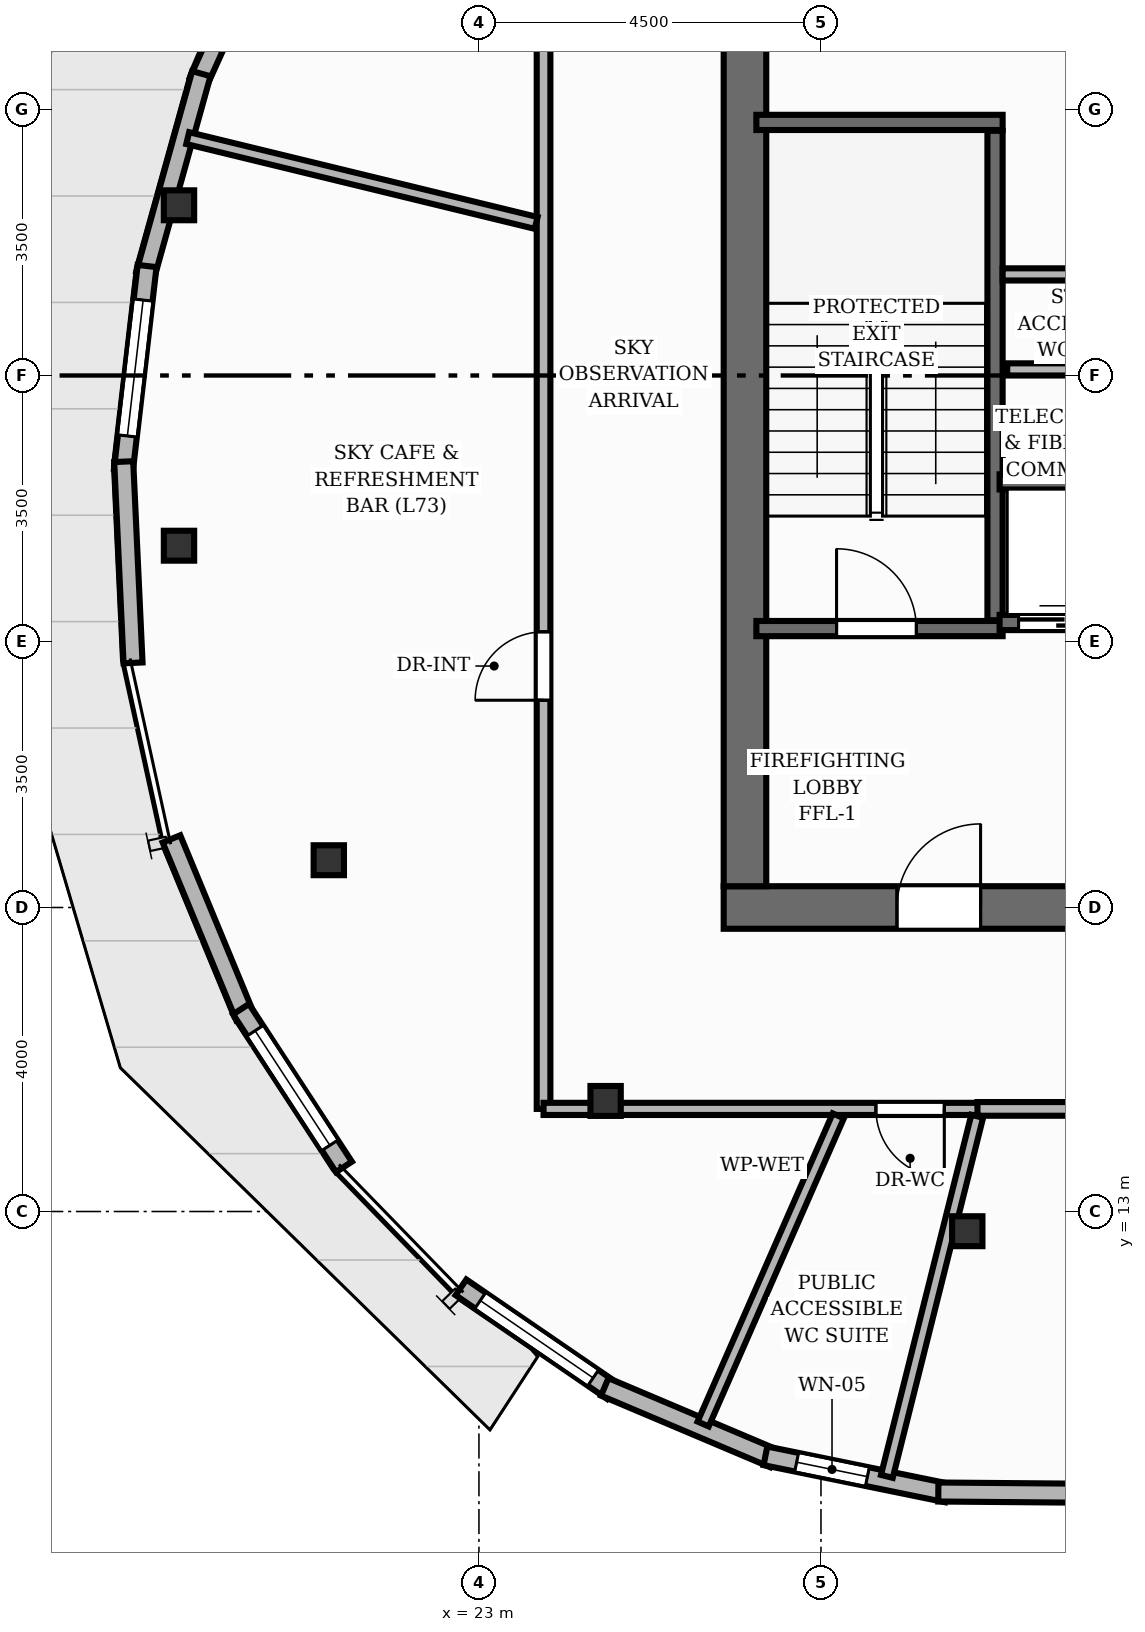
"""IFC4 building model, lengths in metres.
Left out: names, types, materials, properties, quantities, classifications, styles, units other than length and angle.
Written with IfcOpenShell. Run it as: python <this file> out.ifc"""

import sys

from ifc_helpers import new_model, si_unit, direction, frame, frame_2d, origin, origin_2d, place, context, subcontext, project, spatial, rectangle, i_section, extrude, element, fill, save


model = new_model("IFC4")
c1 = context("Model", 3, precision=1e-05, world=origin(), true_north=direction((0.0, 1.0)))
c2 = subcontext(c1, "Body", "Model", "MODEL_VIEW")
j1 = project(units=[si_unit("LENGTHUNIT", "METRE"), si_unit("PLANEANGLEUNIT", "RADIAN")], contexts=[c1])
p1 = place(None, origin())
s1 = spatial("IfcSite", under=j1, at=p1, CompositionType="ELEMENT")
p2 = place(p1, origin())
s2 = spatial("IfcBuilding", under=s1, at=p2, CompositionType="ELEMENT")
p3 = place(p2, frame((0.0, 0.0, 243.04)))
s3 = spatial("IfcBuildingStorey", under=s2, at=p3, CompositionType="ELEMENT", Elevation=243.04)
p4 = place(p3, frame((26.22, 17.0, 0.0), z_axis=(0.0, 0.0, 1.0), x_axis=(1.0, 0.0, 0.0)))
e1 = element("IfcWall", 1, at=p4, inside=s3, PredefinedType="SHEAR", context=c2, shape_type="SweptSolid", body=[
    extrude(rectangle(XDim=11.56, YDim=0.56, at=frame_2d((5.78, 0.0))), origin(), (0.0, 0.0, 1.0), 3.84),
])
p5 = place(p4, frame((2.28, 0.0, 0.0)))
e2 = element("IfcOpeningElement", 2, at=p5, cuts=e1, PredefinedType="OPENING", context=c2, shape_type="SweptSolid", body=[
    extrude(rectangle(XDim=1.1, YDim=2.15, at=frame_2d((0.55, 1.075))), frame((0.0, 0.29, 0.0), z_axis=(0.0, -1.0, 0.0), x_axis=(1.0, 0.0, 0.0)), (0.0, 0.0, 1.0), 0.58),
])
p6 = place(p4, frame((7.68, 0.0, 0.0)))
e3 = element("IfcOpeningElement", 3, at=p6, cuts=e1, PredefinedType="OPENING", context=c2, shape_type="SweptSolid", body=[
    extrude(rectangle(XDim=1.1, YDim=2.15, at=frame_2d((0.55, 1.075))), frame((0.0, 0.29, 0.0), z_axis=(0.0, -1.0, 0.0), x_axis=(1.0, 0.0, 0.0)), (0.0, 0.0, 1.0), 0.58),
])
p7 = place(p4, frame((9.48, 0.0, 0.0)))
e4 = element("IfcOpeningElement", 4, at=p7, cuts=e1, PredefinedType="OPENING", context=c2, shape_type="SweptSolid", body=[
    extrude(rectangle(XDim=1.1, YDim=2.15, at=frame_2d((0.55, 1.075))), frame((0.0, 0.29, 0.0), z_axis=(0.0, -1.0, 0.0), x_axis=(1.0, 0.0, 0.0)), (0.0, 0.0, 1.0), 0.58),
])
p8 = place(p4, frame((5.83, 0.0, 0.0)))
e5 = element("IfcOpeningElement", 5, at=p8, cuts=e1, PredefinedType="OPENING", context=c2, shape_type="SweptSolid", body=[
    extrude(rectangle(XDim=0.9, YDim=2.1, at=frame_2d((0.45, 1.05))), frame((0.0, 0.29, 0.0), z_axis=(0.0, -1.0, 0.0), x_axis=(1.0, 0.0, 0.0)), (0.0, 0.0, 1.0), 0.58),
])
p9 = place(p3, frame((26.5, 17.28, 0.0), z_axis=(0.0, 0.0, 1.0), x_axis=(0.0, 1.0, 0.0)))
e6 = element("IfcWall", 6, at=p9, inside=s3, PredefinedType="SHEAR", context=c2, shape_type="SweptSolid", body=[
    extrude(rectangle(XDim=13.44, YDim=0.56, at=frame_2d((6.72, 0.0))), origin(), (0.0, 0.0, 1.0), 3.84),
])
for number, where, z_axis, x_axis in (
    (7, (19.054, 26.24, 0.0), (0.0, 0.0, 1.0), (1.0, 0.0, 0.0)),
    (8, (19.054, 21.76, 0.0), (0.0, 0.0, 1.0), (1.0, 0.0, 0.0)),
    (9, (21.025, 17.622, 0.0), (0.0, 0.0, 1.0), (1.0, 0.0, 0.0)),
    (10, (24.667, 14.455, 0.0), (0.0, 0.0, 1.0), (1.0, 0.0, 0.0)),
    (11, (29.425, 12.74, 0.0), (0.0, 0.0, 1.0), (1.0, 0.0, 0.0)),
):
    element("IfcColumn", number, at=place(p3, frame(where, z_axis=z_axis, x_axis=x_axis)), inside=s3, PredefinedType="COLUMN", context=c2, shape_type="SweptSolid", body=[
        extrude(i_section(OverallWidth=0.399, OverallDepth=0.394, WebThickness=0.023, FlangeThickness=0.037, at=origin_2d()), origin(), (0.0, 0.0, 1.0), 3.84),
    ])
p10 = place(p3, frame((19.31, 27.869, 0.0), z_axis=(0.0, 0.0, 1.0), x_axis=(0.411961415151, 0.911201290839, 0.0)))
e12 = element("IfcWall", 12, at=p10, inside=s3, PredefinedType="SOLIDWALL", context=c2, shape_type="SweptSolid", body=[
    extrude(rectangle(XDim=2.758, YDim=0.25, at=frame_2d((1.379, 0.0))), origin(), (0.0, 0.0, 1.0), 3.52),
])
p11 = place(p10, frame((0.479, 0.0, 0.85)))
e13 = element("IfcOpeningElement", 13, at=p11, cuts=e12, PredefinedType="OPENING", context=c2, shape_type="SweptSolid", body=[
    extrude(rectangle(XDim=1.8, YDim=2.0, at=frame_2d((0.9, 1.0))), frame((0.0, 0.135, 0.0), z_axis=(0.0, -1.0, 0.0), x_axis=(1.0, 0.0, 0.0)), (0.0, 0.0, 1.0), 0.27),
])
p12 = place(p3, frame((18.613, 25.333, 0.0), z_axis=(0.0, 0.0, 1.0), x_axis=(0.268356519564, 0.963319665743, 0.0)))
e14 = element("IfcWall", 14, at=p12, inside=s3, PredefinedType="SOLIDWALL", context=c2, shape_type="SweptSolid", body=[
    extrude(rectangle(XDim=2.738, YDim=0.25, at=frame_2d((1.369, 0.0))), origin(), (0.0, 0.0, 1.0), 3.137),
])
p13 = place(p3, frame((18.323, 22.757, 0.0), z_axis=(0.0, 0.0, 1.0), x_axis=(0.115121415392, 0.993351428105, 0.0)))
e15 = element("IfcWall", 15, at=p13, inside=s3, PredefinedType="SOLIDWALL", context=c2, shape_type="SweptSolid", body=[
    extrude(rectangle(XDim=2.702, YDim=0.25, at=frame_2d((1.351, 0.0))), origin(), (0.0, 0.0, 1.0), 3.137),
])
p14 = place(p13, frame((0.451, 0.0, 0.85)))
e16 = element("IfcOpeningElement", 16, at=p14, cuts=e15, PredefinedType="OPENING", context=c2, shape_type="SweptSolid", body=[
    extrude(rectangle(XDim=1.8, YDim=2.0, at=frame_2d((0.9, 1.0))), frame((0.0, 0.135, 0.0), z_axis=(0.0, -1.0, 0.0), x_axis=(1.0, 0.0, 0.0)), (0.0, 0.0, 1.0), 0.27),
])
p15 = place(p3, frame((18.449, 20.219, 0.0), z_axis=(0.0, 0.0, 1.0), x_axis=(-0.046326751692, 0.998926339666, 0.0)))
e17 = element("IfcWall", 17, at=p15, inside=s3, PredefinedType="SOLIDWALL", context=c2, shape_type="SweptSolid", body=[
    extrude(rectangle(XDim=2.651, YDim=0.25, at=frame_2d((1.325, 0.0))), origin(), (0.0, 0.0, 1.0), 3.52),
])
p16 = place(p3, frame((19.923, 15.563, 0.0), z_axis=(0.0, 0.0, 1.0), x_axis=(-0.382320564885, 0.924029753669, 0.0)))
e18 = element("IfcWall", 18, at=p16, inside=s3, PredefinedType="SOLIDWALL", context=c2, shape_type="SweptSolid", body=[
    extrude(rectangle(XDim=2.532, YDim=0.25, at=frame_2d((1.266, 0.0))), origin(), (0.0, 0.0, 1.0), 3.52),
])
p17 = place(p3, frame((21.224, 13.587, 0.0), z_axis=(0.0, 0.0, 1.0), x_axis=(-0.546327887975, 0.837571393268, 0.0)))
e19 = element("IfcWall", 19, at=p17, inside=s3, PredefinedType="SOLIDWALL", context=c2, shape_type="SweptSolid", body=[
    extrude(rectangle(XDim=2.478, YDim=0.25, at=frame_2d((1.239, 0.0))), origin(), (0.0, 0.0, 1.0), 3.52),
])
p18 = place(p17, frame((0.339, 0.0, 0.85)))
e20 = element("IfcOpeningElement", 20, at=p18, cuts=e19, PredefinedType="OPENING", context=c2, shape_type="SweptSolid", body=[
    extrude(rectangle(XDim=1.8, YDim=2.0, at=frame_2d((0.9, 1.0))), frame((0.0, 0.135, 0.0), z_axis=(0.0, -1.0, 0.0), x_axis=(1.0, 0.0, 0.0)), (0.0, 0.0, 1.0), 0.27),
])
p19 = place(p3, frame((24.756, 10.637, 0.0), z_axis=(0.0, 0.0, 1.0), x_axis=(-0.824905308137, 0.565270937345, 0.0)))
e21 = element("IfcWall", 21, at=p19, inside=s3, PredefinedType="SOLIDWALL", context=c2, shape_type="SweptSolid", body=[
    extrude(rectangle(XDim=2.415, YDim=0.25, at=frame_2d((1.208, 0.0))), origin(), (0.0, 0.0, 1.0), 3.52),
])
p20 = place(p19, frame((0.307, 0.0, 0.85)))
e22 = element("IfcOpeningElement", 22, at=p20, cuts=e21, PredefinedType="OPENING", context=c2, shape_type="SweptSolid", body=[
    extrude(rectangle(XDim=1.8, YDim=2.0, at=frame_2d((0.9, 1.0))), frame((0.0, 0.135, 0.0), z_axis=(0.0, -1.0, 0.0), x_axis=(1.0, 0.0, 0.0)), (0.0, 0.0, 1.0), 0.27),
])
p21 = place(p3, frame((26.879, 9.751, 0.0), z_axis=(0.0, 0.0, 1.0), x_axis=(-0.920923989116, 0.389742230546, 0.0)))
e23 = element("IfcWall", 23, at=p21, inside=s3, PredefinedType="SOLIDWALL", context=c2, shape_type="SweptSolid", body=[
    extrude(rectangle(XDim=2.415, YDim=0.25, at=frame_2d((1.208, 0.0))), origin(), (0.0, 0.0, 1.0), 3.52),
])
p22 = place(p3, frame((29.157, 9.297, 0.0), z_axis=(0.0, 0.0, 1.0), x_axis=(-0.979739512471, 0.200276028779, 0.0)))
e24 = element("IfcWall", 24, at=p22, inside=s3, PredefinedType="SOLIDWALL", context=c2, shape_type="SweptSolid", body=[
    extrude(rectangle(XDim=2.437, YDim=0.25, at=frame_2d((1.218, 0.0))), origin(), (0.0, 0.0, 1.0), 3.52),
])
p23 = place(p22, frame((1.068, 0.0, 0.85)))
e25 = element("IfcOpeningElement", 25, at=p23, cuts=e24, PredefinedType="OPENING", context=c2, shape_type="SweptSolid", body=[
    extrude(rectangle(XDim=0.95, YDim=1.45, at=frame_2d((0.475, 0.725))), frame((0.0, 0.135, 0.0), z_axis=(0.0, -1.0, 0.0), x_axis=(1.0, 0.0, 0.0)), (0.0, 0.0, 1.0), 0.27),
])
p24 = place(p3, frame((31.521, 9.289, 0.0), z_axis=(0.0, 0.0, 1.0), x_axis=(-0.999965743314, 0.008277209543, 0.0)))
e26 = element("IfcWall", 26, at=p24, inside=s3, PredefinedType="SOLIDWALL", context=c2, shape_type="SweptSolid", body=[
    extrude(rectangle(XDim=2.478, YDim=0.25, at=frame_2d((1.239, 0.0))), origin(), (0.0, 0.0, 1.0), 3.52),
])
p25 = place(p3, frame((29.79, 20.78, 0.0), z_axis=(0.0, 0.0, 1.0), x_axis=(0.0, 1.0, 0.0)))
e27 = element("IfcWall", 27, at=p25, inside=s3, PredefinedType="SHEAR", context=c2, shape_type="SweptSolid", body=[
    extrude(rectangle(XDim=6.44, YDim=0.2, at=frame_2d((3.22, 0.0))), origin(), (0.0, 0.0, 1.0), 3.84),
])
p26 = place(p3, frame((26.65, 27.33, 0.0), z_axis=(0.0, 0.0, 1.0), x_axis=(1.0, 0.0, 0.0)))
e28 = element("IfcWall", 28, at=p26, inside=s3, PredefinedType="SHEAR", context=c2, shape_type="SweptSolid", body=[
    extrude(rectangle(XDim=3.24, YDim=0.2, at=frame_2d((1.62, 0.0))), origin(), (0.0, 0.0, 1.0), 3.84),
])
p27 = place(p3, frame((26.65, 20.67, 0.0), z_axis=(0.0, 0.0, 1.0), x_axis=(1.0, 0.0, 0.0)))
e29 = element("IfcWall", 29, at=p27, inside=s3, PredefinedType="SHEAR", context=c2, shape_type="SweptSolid", body=[
    extrude(rectangle(XDim=3.24, YDim=0.2, at=frame_2d((1.62, 0.0))), origin(), (0.0, 0.0, 1.0), 3.84),
])
p28 = place(p27, frame((1.055, 0.0, 0.0)))
e30 = element("IfcOpeningElement", 30, at=p28, cuts=e29, PredefinedType="OPENING", context=c2, shape_type="SweptSolid", body=[
    extrude(rectangle(XDim=1.05, YDim=2.15, at=frame_2d((0.525, 1.075))), frame((0.0, 0.11, 0.0), z_axis=(0.0, -1.0, 0.0), x_axis=(1.0, 0.0, 0.0)), (0.0, 0.0, 1.0), 0.22),
])
p29 = place(p3, frame((29.85, 20.75, 0.0), z_axis=(0.0, 0.0, 1.0), x_axis=(1.0, 0.0, 0.0)))
e31 = element("IfcWall", 31, at=p29, inside=s3, PredefinedType="SHEAR", context=c2, shape_type="SweptSolid", body=[
    extrude(rectangle(XDim=2.3, YDim=0.2, at=frame_2d((1.15, 0.0))), origin(), (0.0, 0.0, 1.0), 3.84),
])
p30 = place(p29, frame((0.25, 0.0, 0.0)))
e32 = element("IfcOpeningElement", 32, at=p30, cuts=e31, PredefinedType="OPENING", context=c2, shape_type="SweptSolid", body=[
    extrude(rectangle(XDim=1.1, YDim=2.15, at=frame_2d((0.55, 1.075))), frame((0.0, 0.11, 0.0), z_axis=(0.0, -1.0, 0.0), x_axis=(1.0, 0.0, 0.0)), (0.0, 0.0, 1.0), 0.22),
])
p31 = place(p3, frame((29.85, 22.6, 0.0), z_axis=(0.0, 0.0, 1.0), x_axis=(1.0, 0.0, 0.0)))
e33 = element("IfcWall", 33, at=p31, inside=s3, PredefinedType="SHEAR", context=c2, shape_type="SweptSolid", body=[
    extrude(rectangle(XDim=2.3, YDim=0.2, at=frame_2d((1.15, 0.0))), origin(), (0.0, 0.0, 1.0), 3.84),
])
p32 = place(p3, frame((29.95, 24.08, 0.0), z_axis=(0.0, 0.0, 1.0), x_axis=(1.0, 0.0, 0.0)))
e34 = element("IfcWall", 34, at=p32, inside=s3, PredefinedType="PLUMBINGWALL", context=c2, shape_type="SweptSolid", body=[
    extrude(rectangle(XDim=4.13, YDim=0.16, at=frame_2d((2.065, 0.0))), origin(), (0.0, 0.0, 1.0), 3.515),
])
p33 = place(p32, frame((2.55, 0.0, 0.0)))
e35 = element("IfcOpeningElement", 35, at=p33, cuts=e34, PredefinedType="OPENING", context=c2, shape_type="SweptSolid", body=[
    extrude(rectangle(XDim=0.9, YDim=2.1, at=frame_2d((0.45, 1.05))), frame((0.0, 0.09, 0.0), z_axis=(0.0, -1.0, 0.0), x_axis=(1.0, 0.0, 0.0)), (0.0, 0.0, 1.0), 0.18),
])
p34 = place(p3, frame((29.89, 25.33, 0.0), z_axis=(0.0, 0.0, 1.0), x_axis=(1.0, 0.0, 0.0)))
e36 = element("IfcWall", 36, at=p34, inside=s3, PredefinedType="PLUMBINGWALL", context=c2, shape_type="SweptSolid", body=[
    extrude(rectangle(XDim=1.94, YDim=0.16, at=frame_2d((0.97, 0.0))), origin(), (0.0, 0.0, 1.0), 3.515),
])
p35 = place(p3, frame((23.85, 14.35, 0.0), z_axis=(0.0, 0.0, 1.0), x_axis=(0.0, 1.0, 0.0)))
e37 = element("IfcWall", 37, at=p35, inside=s3, PredefinedType="PARTITIONING", context=c2, shape_type="SweptSolid", body=[
    extrude(rectangle(XDim=19.3, YDim=0.18, at=frame_2d((9.65, 0.0))), origin(), (0.0, 0.0, 1.0), 3.515),
])
p36 = place(p35, frame((5.377, 0.0, 0.0)))
e38 = element("IfcOpeningElement", 38, at=p36, cuts=e37, PredefinedType="OPENING", context=c2, shape_type="SweptSolid", body=[
    extrude(rectangle(XDim=0.9, YDim=2.1, at=frame_2d((0.45, 1.05))), frame((0.0, 0.1, 0.0), z_axis=(0.0, -1.0, 0.0), x_axis=(1.0, 0.0, 0.0)), (0.0, 0.0, 1.0), 0.2),
])
p37 = place(p3, frame((29.6, 14.35, 0.0), z_axis=(0.0, 0.0, 1.0), x_axis=(-1.0, 0.0, 0.0)))
e39 = element("IfcWall", 39, at=p37, inside=s3, PredefinedType="PLUMBINGWALL", context=c2, shape_type="SweptSolid", body=[
    extrude(rectangle(XDim=5.75, YDim=0.16, at=frame_2d((2.875, 0.0))), origin(), (0.0, 0.0, 1.0), 3.048),
])
p38 = place(p37, frame((0.477, 0.0, 0.0)))
e40 = element("IfcOpeningElement", 40, at=p38, cuts=e39, PredefinedType="OPENING", context=c2, shape_type="SweptSolid", body=[
    extrude(rectangle(XDim=0.9, YDim=2.1, at=frame_2d((0.45, 1.05))), frame((0.0, 0.09, 0.0), z_axis=(0.0, -1.0, 0.0), x_axis=(1.0, 0.0, 0.0)), (0.0, 0.0, 1.0), 0.18),
])
p39 = place(p3, frame((40.15, 14.35, 0.0), z_axis=(0.0, 0.0, 1.0), x_axis=(-1.0, 0.0, 0.0)))
e41 = element("IfcWall", 41, at=p39, inside=s3, PredefinedType="PARTITIONING", context=c2, shape_type="SweptSolid", body=[
    extrude(rectangle(XDim=10.591, YDim=0.18, at=frame_2d((5.295, 0.0))), origin(), (0.0, 0.0, 1.0), 3.048),
])
p40 = place(p39, frame((4.845, 0.0, 0.0)))
e42 = element("IfcOpeningElement", 42, at=p40, cuts=e41, PredefinedType="OPENING", context=c2, shape_type="SweptSolid", body=[
    extrude(rectangle(XDim=0.9, YDim=2.1, at=frame_2d((0.45, 1.05))), frame((0.0, 0.1, 0.0), z_axis=(0.0, -1.0, 0.0), x_axis=(1.0, 0.0, 0.0)), (0.0, 0.0, 1.0), 0.2),
])
p41 = place(p3, frame((23.753, 26.007, 0.0), z_axis=(0.0, 0.0, 1.0), x_axis=(-0.971624549103, 0.236528509024, 0.0)))
e43 = element("IfcWall", 43, at=p41, inside=s3, PredefinedType="PLUMBINGWALL", context=c2, shape_type="SweptSolid", body=[
    extrude(rectangle(XDim=4.718, YDim=0.16, at=frame_2d((2.359, 0.0))), origin(), (0.0, 0.0, 1.0), 3.515),
])
p42 = place(p3, frame((27.728, 14.258, 0.0), z_axis=(0.0, 0.0, 1.0), x_axis=(-0.40164607795, -0.91579497054, 0.0)))
e44 = element("IfcWall", 44, at=p42, inside=s3, PredefinedType="PLUMBINGWALL", context=c2, shape_type="SweptSolid", body=[
    extrude(rectangle(XDim=4.427, YDim=0.16, at=frame_2d((2.213, 0.0))), origin(), (0.0, 0.0, 1.0), 3.515),
])
p43 = place(p3, frame((28.367, 9.515, 0.0), z_axis=(0.0, 0.0, 1.0), x_axis=(0.243299941273, 0.969951101127, 0.0)))
e45 = element("IfcWall", 45, at=p43, inside=s3, PredefinedType="PLUMBINGWALL", context=c2, shape_type="SweptSolid", body=[
    extrude(rectangle(XDim=4.885, YDim=0.16, at=frame_2d((2.442, 0.0))), origin(), (0.0, 0.0, 1.0), 2.963),
])
p44 = place(p14, origin())
e46 = element("IfcWindow", 46, at=p44, inside=s3, PartitioningType="SINGLE_PANEL", PredefinedType="WINDOW", context=c2, shape_type="SweptSolid", body=[
    extrude(rectangle(XDim=1.8, YDim=2.0, at=frame_2d((0.9, 1.0))), frame((0.0, 0.03, 0.0), z_axis=(0.0, -1.0, 0.0), x_axis=(1.0, 0.0, 0.0)), (0.0, 0.0, 1.0), 0.06),
])
fill(e16, e46)
p45 = place(p18, origin())
e47 = element("IfcWindow", 47, at=p45, inside=s3, PartitioningType="SINGLE_PANEL", PredefinedType="WINDOW", context=c2, shape_type="SweptSolid", body=[
    extrude(rectangle(XDim=1.8, YDim=2.0, at=frame_2d((0.9, 1.0))), frame((0.0, 0.03, 0.0), z_axis=(0.0, -1.0, 0.0), x_axis=(1.0, 0.0, 0.0)), (0.0, 0.0, 1.0), 0.06),
])
fill(e20, e47)
p46 = place(p20, origin())
e48 = element("IfcWindow", 48, at=p46, inside=s3, PartitioningType="SINGLE_PANEL", PredefinedType="WINDOW", context=c2, shape_type="SweptSolid", body=[
    extrude(rectangle(XDim=1.8, YDim=2.0, at=frame_2d((0.9, 1.0))), frame((0.0, 0.03, 0.0), z_axis=(0.0, -1.0, 0.0), x_axis=(1.0, 0.0, 0.0)), (0.0, 0.0, 1.0), 0.06),
])
fill(e22, e48)
p47 = place(p23, origin())
e49 = element("IfcWindow", 49, at=p47, inside=s3, PartitioningType="SINGLE_PANEL", PredefinedType="WINDOW", context=c2, shape_type="SweptSolid", body=[
    extrude(rectangle(XDim=0.95, YDim=1.45, at=frame_2d((0.475, 0.725))), frame((0.0, 0.03, 0.0), z_axis=(0.0, -1.0, 0.0), x_axis=(1.0, 0.0, 0.0)), (0.0, 0.0, 1.0), 0.06),
])
fill(e25, e49)
p48 = place(p28, origin())
e50 = element("IfcDoor", 50, at=p48, inside=s3, OperationType="SINGLE_SWING_LEFT", PredefinedType="DOOR", context=c2, shape_type="SweptSolid", body=[
    extrude(rectangle(XDim=1.05, YDim=2.15, at=frame_2d((0.525, 1.075))), frame((0.0, 0.025, 0.0), z_axis=(0.0, -1.0, 0.0), x_axis=(1.0, 0.0, 0.0)), (0.0, 0.0, 1.0), 0.05),
])
fill(e30, e50)
p49 = place(p5, origin())
e51 = element("IfcDoor", 51, at=p49, inside=s3, OperationType="SINGLE_SWING_RIGHT", PredefinedType="DOOR", context=c2, shape_type="SweptSolid", body=[
    extrude(rectangle(XDim=1.1, YDim=2.15, at=frame_2d((0.55, 1.075))), frame((0.0, 0.025, 0.0), z_axis=(0.0, -1.0, 0.0), x_axis=(1.0, 0.0, 0.0)), (0.0, 0.0, 1.0), 0.05),
])
fill(e2, e51)
p50 = place(p30, origin())
e52 = element("IfcDoor", 52, at=p50, inside=s3, OperationType="DOUBLE_DOOR_SLIDING", PredefinedType="DOOR", context=c2, shape_type="SweptSolid", body=[
    extrude(rectangle(XDim=1.1, YDim=2.15, at=frame_2d((0.55, 1.075))), frame((0.0, 0.025, 0.0), z_axis=(0.0, -1.0, 0.0), x_axis=(1.0, 0.0, 0.0)), (0.0, 0.0, 1.0), 0.05),
])
fill(e32, e52)
p51 = place(p36, origin())
e53 = element("IfcDoor", 53, at=p51, inside=s3, OperationType="SINGLE_SWING_LEFT", PredefinedType="DOOR", context=c2, shape_type="SweptSolid", body=[
    extrude(rectangle(XDim=0.9, YDim=2.1, at=frame_2d((0.45, 1.05))), frame((0.0, 0.025, 0.0), z_axis=(0.0, -1.0, 0.0), x_axis=(1.0, 0.0, 0.0)), (0.0, 0.0, 1.0), 0.05),
])
fill(e38, e53)
p52 = place(p38, origin())
e54 = element("IfcDoor", 54, at=p52, inside=s3, OperationType="SINGLE_SWING_LEFT", PredefinedType="DOOR", context=c2, shape_type="SweptSolid", body=[
    extrude(rectangle(XDim=0.9, YDim=2.1, at=frame_2d((0.45, 1.05))), frame((0.0, 0.025, 0.0), z_axis=(0.0, -1.0, 0.0), x_axis=(1.0, 0.0, 0.0)), (0.0, 0.0, 1.0), 0.05),
])
fill(e40, e54)
save(model, sys.argv[1])
